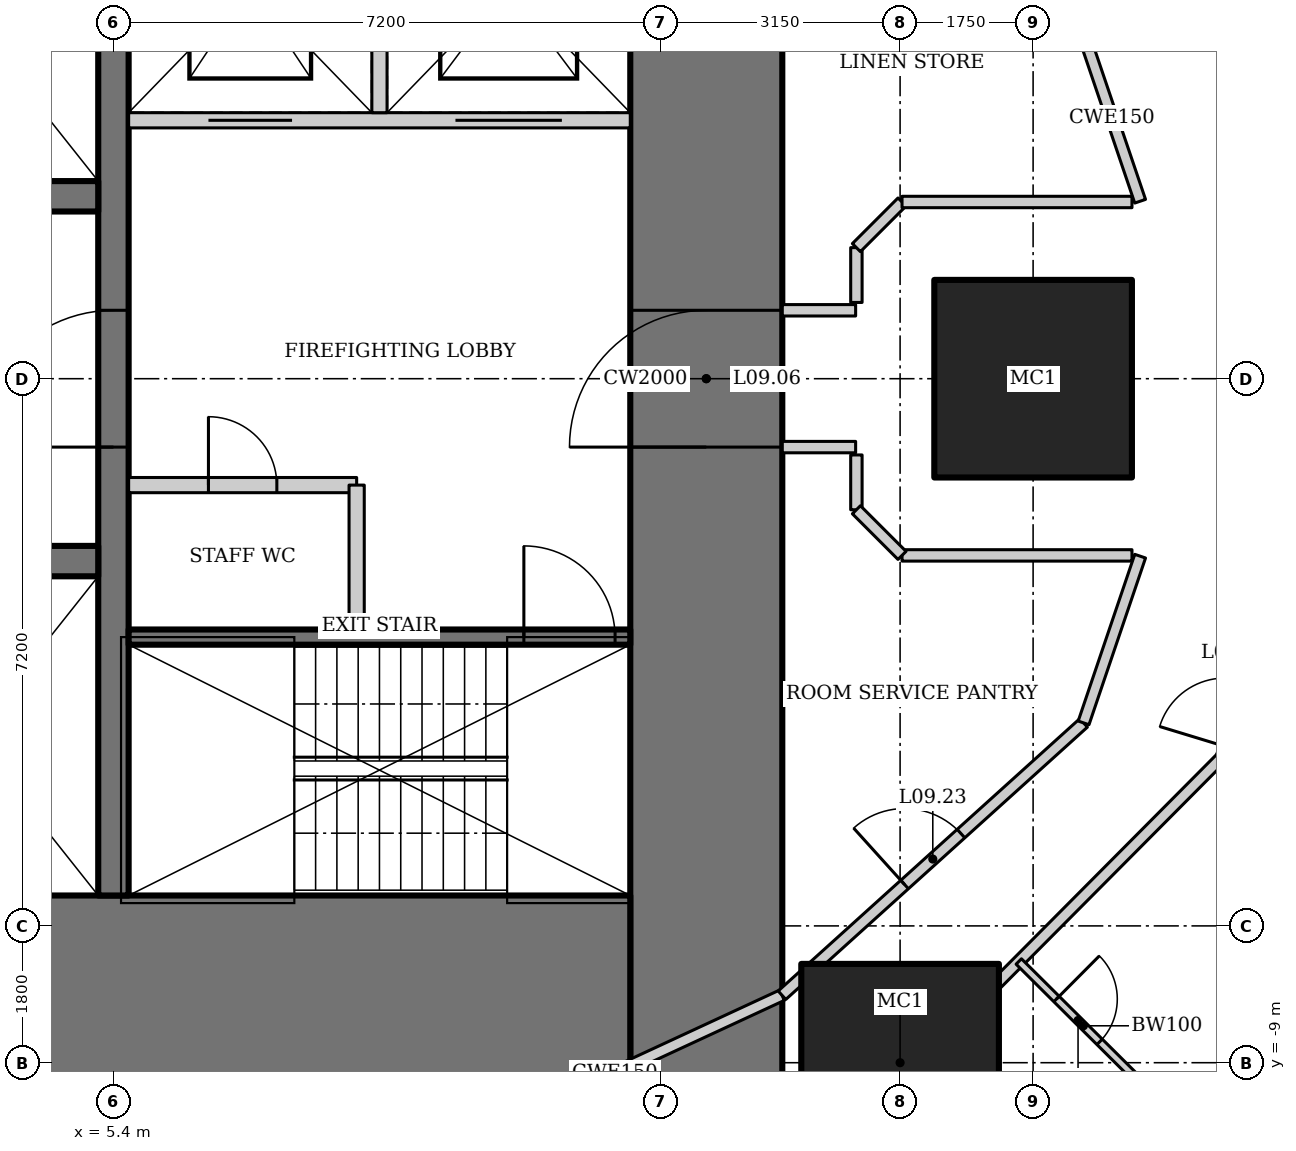
"""IFC4 building model, lengths in metres.
Left out: names, types, materials, properties, quantities, classifications, styles, units other than length and angle.
Written with IfcOpenShell. Run it as: python <this file> out.ifc"""

import sys

from ifc_helpers import new_model, si_unit, direction, frame, frame_2d, origin, origin_2d, place, context, subcontext, project, spatial, rectangle, hollow_rectangle, extrude, element, fill, save


model = new_model("IFC4")
c1 = context("Model", 3, precision=1e-05, world=origin(), true_north=direction((0.0, 1.0)))
c2 = subcontext(c1, "Body", "Model", "MODEL_VIEW")
j1 = project(units=[si_unit("LENGTHUNIT", "METRE"), si_unit("PLANEANGLEUNIT", "RADIAN")], contexts=[c1])
p1 = place(None, origin())
s1 = spatial("IfcSite", under=j1, at=p1, CompositionType="ELEMENT")
p2 = place(p1, origin())
s2 = spatial("IfcBuilding", under=s1, at=p2, CompositionType="ELEMENT")
p3 = place(p2, frame((0.0, 0.0, 47.8)))
s3 = spatial("IfcBuildingStorey", under=s2, at=p3, CompositionType="ELEMENT", Elevation=47.8)
for number, where, z_axis, x_axis in (
    (1, (17.5, 0.0, 0.0), (0.0, 0.0, 1.0), (1.0, 0.0, 0.0)),
    (2, (15.75, -9.0, 0.0), (0.0, 0.0, 1.0), (1.0, 0.0, 0.0)),
):
    element("IfcColumn", number, at=place(p3, frame(where, z_axis=z_axis, x_axis=x_axis)), inside=s3, PredefinedType="COLUMN", context=c2, shape_type="SweptSolid", body=[
        extrude(hollow_rectangle(XDim=2.6, YDim=2.6, WallThickness=0.13, at=origin_2d()), origin(), (0.0, 0.0, 1.0), 3.6),
    ])
p4 = place(p3, frame((13.2, -13.0, 0.0), z_axis=(0.0, 0.0, 1.0), x_axis=(0.0, 1.0, 0.0)))
e3 = element("IfcWall", 3, at=p4, inside=s3, PredefinedType="SHEAR", context=c2, shape_type="SweptSolid", body=[
    extrude(rectangle(XDim=26.0, YDim=2.0, at=frame_2d((13.0, 0.0))), origin(), (0.0, 0.0, 1.0), 3.6),
])
p5 = place(p4, frame((12.1, 0.0, 0.0)))
e4 = element("IfcOpeningElement", 4, at=p5, cuts=e3, PredefinedType="OPENING", context=c2, shape_type="SweptSolid", body=[
    extrude(rectangle(XDim=1.8, YDim=2.1, at=frame_2d((0.9, 1.05))), frame((0.0, 1.01, 0.0), z_axis=(0.0, -1.0, 0.0), x_axis=(1.0, 0.0, 0.0)), (0.0, 0.0, 1.0), 2.02),
])
p6 = place(p3, frame((-12.2, -8.0, 0.0), z_axis=(0.0, 0.0, 1.0), x_axis=(1.0, 0.0, 0.0)))
e5 = element("IfcWall", 5, at=p6, inside=s3, PredefinedType="SHEAR", context=c2, shape_type="SweptSolid", body=[
    extrude(rectangle(XDim=24.4, YDim=2.4, at=frame_2d((12.2, 0.0))), origin(), (0.0, 0.0, 1.0), 3.6),
])
p7 = place(p3, frame((5.4, -6.8, 0.0), z_axis=(0.0, 0.0, 1.0), x_axis=(0.0, 1.0, 0.0)))
e6 = element("IfcWall", 6, at=p7, inside=s3, PredefinedType="SHEAR", context=c2, shape_type="SweptSolid", body=[
    extrude(rectangle(XDim=13.6, YDim=0.4, at=frame_2d((6.8, 0.0))), origin(), (0.0, 0.0, 1.0), 3.6),
])
p8 = place(p7, frame((5.9, 0.0, 0.0)))
e7 = element("IfcOpeningElement", 7, at=p8, cuts=e6, PredefinedType="OPENING", context=c2, shape_type="SweptSolid", body=[
    extrude(rectangle(XDim=1.8, YDim=2.1, at=frame_2d((0.9, 1.05))), frame((0.0, 0.21, 0.0), z_axis=(0.0, -1.0, 0.0), x_axis=(1.0, 0.0, 0.0)), (0.0, 0.0, 1.0), 0.42),
])
p9 = place(p3, frame((-5.2, -2.4, 0.0), z_axis=(0.0, 0.0, 1.0), x_axis=(1.0, 0.0, 0.0)))
e8 = element("IfcWall", 8, at=p9, inside=s3, PredefinedType="SHEAR", context=c2, shape_type="SweptSolid", body=[
    extrude(rectangle(XDim=10.4, YDim=0.4, at=frame_2d((5.2, 0.0))), origin(), (0.0, 0.0, 1.0), 3.6),
])
p10 = place(p9, frame((0.55, 0.0, 0.0)))
e9 = element("IfcOpeningElement", 9, at=p10, cuts=e8, PredefinedType="OPENING", context=c2, shape_type="SweptSolid", body=[
    extrude(rectangle(XDim=1.1, YDim=2.2, at=frame_2d((0.55, 1.1))), frame((0.0, 0.21, 0.0), z_axis=(0.0, -1.0, 0.0), x_axis=(1.0, 0.0, 0.0)), (0.0, 0.0, 1.0), 0.42),
])
p11 = place(p9, frame((4.083, 0.0, 0.0)))
e10 = element("IfcOpeningElement", 10, at=p11, cuts=e8, PredefinedType="OPENING", context=c2, shape_type="SweptSolid", body=[
    extrude(rectangle(XDim=1.1, YDim=2.2, at=frame_2d((0.55, 1.1))), frame((0.0, 0.21, 0.0), z_axis=(0.0, -1.0, 0.0), x_axis=(1.0, 0.0, 0.0)), (0.0, 0.0, 1.0), 0.42),
])
p12 = place(p9, frame((7.617, 0.0, 0.0)))
e11 = element("IfcOpeningElement", 11, at=p12, cuts=e8, PredefinedType="OPENING", context=c2, shape_type="SweptSolid", body=[
    extrude(rectangle(XDim=1.1, YDim=2.2, at=frame_2d((0.55, 1.1))), frame((0.0, 0.21, 0.0), z_axis=(0.0, -1.0, 0.0), x_axis=(1.0, 0.0, 0.0)), (0.0, 0.0, 1.0), 0.42),
])
p13 = place(p3, frame((5.2, 2.4, 0.0), z_axis=(0.0, 0.0, 1.0), x_axis=(-1.0, 0.0, 0.0)))
e12 = element("IfcWall", 12, at=p13, inside=s3, PredefinedType="SHEAR", context=c2, shape_type="SweptSolid", body=[
    extrude(rectangle(XDim=10.4, YDim=0.4, at=frame_2d((5.2, 0.0))), origin(), (0.0, 0.0, 1.0), 3.6),
])
p14 = place(p3, frame((5.6, -3.4, 0.0), z_axis=(0.0, 0.0, 1.0), x_axis=(1.0, 0.0, 0.0)))
e13 = element("IfcWall", 13, at=p14, inside=s3, PredefinedType="SHEAR", context=c2, shape_type="SweptSolid", body=[
    extrude(rectangle(XDim=6.6, YDim=0.2, at=frame_2d((3.3, 0.0))), origin(), (0.0, 0.0, 1.0), 3.6),
])
p15 = place(p14, frame((5.2, 0.0, 0.0)))
e14 = element("IfcOpeningElement", 14, at=p15, cuts=e13, PredefinedType="OPENING", context=c2, shape_type="SweptSolid", body=[
    extrude(rectangle(XDim=1.2, YDim=2.1, at=frame_2d((0.6, 1.05))), frame((0.0, 0.11, 0.0), z_axis=(0.0, -1.0, 0.0), x_axis=(1.0, 0.0, 0.0)), (0.0, 0.0, 1.0), 0.22),
])
p16 = place(p3, frame((12.2, 3.4, 0.0), z_axis=(0.0, 0.0, 1.0), x_axis=(-1.0, 0.0, 0.0)))
e15 = element("IfcWall", 15, at=p16, inside=s3, PredefinedType="SOLIDWALL", context=c2, shape_type="SweptSolid", body=[
    extrude(rectangle(XDim=6.6, YDim=0.2, at=frame_2d((3.3, 0.0))), origin(), (0.0, 0.0, 1.0), 3.6),
])
p17 = place(p16, frame((4.45, 0.0, 0.0)))
e16 = element("IfcOpeningElement", 16, at=p17, cuts=e15, PredefinedType="OPENING", context=c2, shape_type="SweptSolid", body=[
    extrude(rectangle(XDim=1.1, YDim=2.2, at=frame_2d((0.55, 1.1))), frame((0.0, 0.11, 0.0), z_axis=(0.0, -1.0, 0.0), x_axis=(1.0, 0.0, 0.0)), (0.0, 0.0, 1.0), 0.22),
])
p18 = place(p16, frame((0.9, 0.0, 0.0)))
e17 = element("IfcOpeningElement", 17, at=p18, cuts=e15, PredefinedType="OPENING", context=c2, shape_type="SweptSolid", body=[
    extrude(rectangle(XDim=1.4, YDim=2.2, at=frame_2d((0.7, 1.1))), frame((0.0, 0.11, 0.0), z_axis=(0.0, -1.0, 0.0), x_axis=(1.0, 0.0, 0.0)), (0.0, 0.0, 1.0), 0.22),
])
p19 = place(p3, frame((8.9, 3.5, 0.0), z_axis=(0.0, 0.0, 1.0), x_axis=(0.0, 1.0, 0.0)))
e18 = element("IfcWall", 18, at=p19, inside=s3, PredefinedType="SOLIDWALL", context=c2, shape_type="SweptSolid", body=[
    extrude(rectangle(XDim=3.3, YDim=0.2, at=frame_2d((1.65, 0.0))), origin(), (0.0, 0.0, 1.0), 3.6),
])
p20 = place(p3, frame((5.6, -1.4, 0.0), z_axis=(0.0, 0.0, 1.0), x_axis=(1.0, 0.0, 0.0)))
e19 = element("IfcWall", 19, at=p20, inside=s3, PredefinedType="SOLIDWALL", context=c2, shape_type="SweptSolid", body=[
    extrude(rectangle(XDim=3.0, YDim=0.2, at=frame_2d((1.5, 0.0))), origin(), (0.0, 0.0, 1.0), 3.45),
])
p21 = place(p20, frame((1.05, 0.0, 0.0)))
e20 = element("IfcOpeningElement", 20, at=p21, cuts=e19, PredefinedType="OPENING", context=c2, shape_type="SweptSolid", body=[
    extrude(rectangle(XDim=0.9, YDim=2.1, at=frame_2d((0.45, 1.05))), frame((0.0, 0.11, 0.0), z_axis=(0.0, -1.0, 0.0), x_axis=(1.0, 0.0, 0.0)), (0.0, 0.0, 1.0), 0.22),
])
p22 = place(p3, frame((8.6, -1.4, 0.0), z_axis=(0.0, 0.0, 1.0), x_axis=(0.0, -1.0, 0.0)))
e21 = element("IfcWall", 21, at=p22, inside=s3, PredefinedType="SOLIDWALL", context=c2, shape_type="SweptSolid", body=[
    extrude(rectangle(XDim=1.9, YDim=0.2, at=frame_2d((0.95, 0.0))), origin(), (0.0, 0.0, 1.0), 3.45),
])
p23 = place(p3, frame((24.435, -13.909, 0.0), z_axis=(0.0, 0.0, 1.0), x_axis=(-0.870612006791, 0.491970256856, 0.0)))
e22 = element("IfcWall", 22, at=p23, inside=s3, PredefinedType="PARTITIONING", context=c2, shape_type="SweptSolid", body=[
    extrude(rectangle(XDim=9.802, YDim=0.15, at=frame_2d((4.901, 0.0))), origin(), (0.0, 0.0, 1.0), 2.693),
])
p24 = place(p3, frame((21.5, 0.0, 0.0), z_axis=(0.0, 0.0, 1.0), x_axis=(-0.291383581394, 0.95660629754, 0.0)))
e23 = element("IfcWall", 23, at=p24, inside=s3, PredefinedType="PARTITIONING", context=c2, shape_type="SweptSolid", body=[
    extrude(rectangle(XDim=5.208, YDim=0.15, at=frame_2d((2.604, 0.0))), origin(), (0.0, 0.0, 1.0), 3.45),
])
p25 = place(p3, frame((11.147, -11.544, 0.0), z_axis=(0.0, 0.0, 1.0), x_axis=(0.888333171507, 0.459199495209, 0.0)))
e24 = element("IfcWall", 24, at=p25, inside=s3, PredefinedType="PARTITIONING", context=c2, shape_type="SweptSolid", body=[
    extrude(rectangle(XDim=5.351, YDim=0.15, at=frame_2d((2.676, 0.0))), origin(), (0.0, 0.0, 1.0), 3.45),
])
p26 = place(p25, frame((0.15, 0.0, 0.0)))
e25 = element("IfcOpeningElement", 25, at=p26, cuts=e24, PredefinedType="OPENING", context=c2, shape_type="SweptSolid", body=[
    extrude(rectangle(XDim=0.9, YDim=2.1, at=frame_2d((0.45, 1.05))), frame((0.0, 0.085, 0.0), z_axis=(0.0, -1.0, 0.0), x_axis=(1.0, 0.0, 0.0)), (0.0, 0.0, 1.0), 0.17),
])
p27 = place(p3, frame((15.901, -9.086, 0.0), z_axis=(0.0, 0.0, 1.0), x_axis=(0.705121546414, 0.709086457904, 0.0)))
e26 = element("IfcWall", 26, at=p27, inside=s3, PredefinedType="PARTITIONING", context=c2, shape_type="SweptSolid", body=[
    extrude(rectangle(XDim=5.788, YDim=0.15, at=frame_2d((2.894, 0.0))), origin(), (0.0, 0.0, 1.0), 3.45),
])
p28 = place(p3, frame((19.982, -4.982, 0.0), z_axis=(0.0, 0.0, 1.0), x_axis=(0.291383581394, 0.95660629754, 0.0)))
e27 = element("IfcWall", 27, at=p28, inside=s3, PredefinedType="PARTITIONING", context=c2, shape_type="SweptSolid", body=[
    extrude(rectangle(XDim=5.208, YDim=0.15, at=frame_2d((2.604, 0.0))), origin(), (0.0, 0.0, 1.0), 3.45),
])
p29 = place(p28, frame((0.15, 0.0, 0.0)))
e28 = element("IfcOpeningElement", 28, at=p29, cuts=e27, PredefinedType="OPENING", context=c2, shape_type="SweptSolid", body=[
    extrude(rectangle(XDim=0.9, YDim=2.1, at=frame_2d((0.45, 1.05))), frame((0.0, 0.085, 0.0), z_axis=(0.0, -1.0, 0.0), x_axis=(1.0, 0.0, 0.0)), (0.0, 0.0, 1.0), 0.17),
])
p30 = place(p3, frame((9.801, -10.149, 0.0), z_axis=(0.0, 0.0, 1.0), x_axis=(0.907279653965, 0.420527798727, 0.0)))
e29 = element("IfcWall", 29, at=p30, inside=s3, PredefinedType="PARTITIONING", context=c2, shape_type="SweptSolid", body=[
    extrude(rectangle(XDim=4.844, YDim=0.15, at=frame_2d((2.422, 0.0))), origin(), (0.0, 0.0, 1.0), 3.45),
])
p31 = place(p3, frame((14.196, -8.112, 0.0), z_axis=(0.0, 0.0, 1.0), x_axis=(0.742194222, 0.670184852731, 0.0)))
e30 = element("IfcWall", 30, at=p31, inside=s3, PredefinedType="PARTITIONING", context=c2, shape_type="SweptSolid", body=[
    extrude(rectangle(XDim=5.347, YDim=0.15, at=frame_2d((2.673, 0.0))), origin(), (0.0, 0.0, 1.0), 3.45),
])
p32 = place(p31, frame((2.173, 0.0, 0.0)))
e31 = element("IfcOpeningElement", 31, at=p32, cuts=e30, PredefinedType="OPENING", context=c2, shape_type="SweptSolid", body=[
    extrude(rectangle(XDim=1.0, YDim=2.1, at=frame_2d((0.5, 1.05))), frame((0.0, 0.085, 0.0), z_axis=(0.0, -1.0, 0.0), x_axis=(1.0, 0.0, 0.0)), (0.0, 0.0, 1.0), 0.17),
])
p33 = place(p3, frame((17.311, -7.668, 0.0), z_axis=(0.0, 0.0, 1.0), x_axis=(0.709138392716, -0.705069315724, 0.0)))
e32 = element("IfcWall", 32, at=p33, inside=s3, PredefinedType="PARTITIONING", context=c2, shape_type="SweptSolid", body=[
    extrude(rectangle(XDim=2.4, YDim=0.1, at=frame_2d((1.2, 0.0))), origin(), (0.0, 0.0, 1.0), 3.45),
])
p34 = place(p33, frame((0.7, 0.0, 0.0)))
e33 = element("IfcOpeningElement", 33, at=p34, cuts=e32, PredefinedType="OPENING", context=c2, shape_type="SweptSolid", body=[
    extrude(rectangle(XDim=0.8, YDim=2.1, at=frame_2d((0.4, 1.05))), frame((0.0, 0.06, 0.0), z_axis=(0.0, -1.0, 0.0), x_axis=(1.0, 0.0, 0.0)), (0.0, 0.0, 1.0), 0.12),
])
for number, where, z_axis, x_axis in (
    (34, (18.908, 2.335, 0.0), (0.0, 0.0, 1.0), (-0.321, 0.947, 0.0)),
    (35, (18.164, -4.529, 0.0), (0.0, 0.0, 1.0), (0.321, 0.947, 0.0)),
):
    element("IfcWall", number, at=place(p3, frame(where, z_axis=z_axis, x_axis=x_axis)), inside=s3, PredefinedType="PARTITIONING", context=c2, shape_type="SweptSolid", body=[
        extrude(rectangle(XDim=2.317, YDim=0.15, at=frame_2d((1.158, 0.0))), origin(), (0.0, 0.0, 1.0), 3.45),
    ])
for number, where, z_axis, x_axis in (
    (36, (14.2, -0.9, 0.0), (0.0, 0.0, 1.0), (1.0, 0.0, 0.0)),
    (37, (14.2, 0.9, 0.0), (0.0, 0.0, 1.0), (1.0, 0.0, 0.0)),
):
    element("IfcWall", number, at=place(p3, frame(where, z_axis=z_axis, x_axis=x_axis)), inside=s3, PredefinedType="PARTITIONING", context=c2, shape_type="SweptSolid", body=[
        extrude(rectangle(XDim=0.965, YDim=0.15, at=frame_2d((0.482, 0.0))), origin(), (0.0, 0.0, 1.0), 3.45),
    ])
p35 = place(p3, frame((15.175, 1.003, 0.0), z_axis=(0.0, 0.0, 1.0), x_axis=(0.0, 1.0, 0.0)))
e38 = element("IfcWall", 38, at=p35, inside=s3, PredefinedType="PARTITIONING", context=c2, shape_type="SweptSolid", body=[
    extrude(rectangle(XDim=0.721, YDim=0.15, at=frame_2d((0.361, 0.0))), origin(), (0.0, 0.0, 1.0), 3.45),
])
p36 = place(p3, frame((15.175, 1.725, 0.0), z_axis=(0.0, 0.0, 1.0), x_axis=(0.707106781187, 0.707106781187, 0.0)))
e39 = element("IfcWall", 39, at=p36, inside=s3, PredefinedType="PARTITIONING", context=c2, shape_type="SweptSolid", body=[
    extrude(rectangle(XDim=0.849, YDim=0.15, at=frame_2d((0.425, 0.0))), origin(), (0.0, 0.0, 1.0), 3.45),
])
p37 = place(p3, frame((15.775, 2.325, 0.0), z_axis=(0.0, 0.0, 1.0), x_axis=(1.0, 0.0, 0.0)))
e40 = element("IfcWall", 40, at=p37, inside=s3, PredefinedType="PARTITIONING", context=c2, shape_type="SweptSolid", body=[
    extrude(rectangle(XDim=3.025, YDim=0.15, at=frame_2d((1.513, 0.0))), origin(), (0.0, 0.0, 1.0), 3.45),
])
p38 = place(p3, frame((15.175, -1.725, 0.0), z_axis=(0.0, 0.0, 1.0), x_axis=(0.0, 1.0, 0.0)))
e41 = element("IfcWall", 41, at=p38, inside=s3, PredefinedType="PARTITIONING", context=c2, shape_type="SweptSolid", body=[
    extrude(rectangle(XDim=0.721, YDim=0.15, at=frame_2d((0.361, 0.0))), origin(), (0.0, 0.0, 1.0), 3.45),
])
p39 = place(p3, frame((18.801, -2.325, 0.0), z_axis=(0.0, 0.0, 1.0), x_axis=(-1.0, 0.0, 0.0)))
e42 = element("IfcWall", 42, at=p39, inside=s3, PredefinedType="PARTITIONING", context=c2, shape_type="SweptSolid", body=[
    extrude(rectangle(XDim=3.025, YDim=0.15, at=frame_2d((1.513, 0.0))), origin(), (0.0, 0.0, 1.0), 3.45),
])
p40 = place(p3, frame((15.775, -2.325, 0.0), z_axis=(0.0, 0.0, 1.0), x_axis=(-0.707106781187, 0.707106781187, 0.0)))
e43 = element("IfcWall", 43, at=p40, inside=s3, PredefinedType="PARTITIONING", context=c2, shape_type="SweptSolid", body=[
    extrude(rectangle(XDim=0.849, YDim=0.15, at=frame_2d((0.425, 0.0))), origin(), (0.0, 0.0, 1.0), 3.45),
])
p41 = place(p21, origin())
e44 = element("IfcDoor", 44, at=p41, inside=s3, OperationType="SINGLE_SWING_LEFT", PredefinedType="DOOR", context=c2, shape_type="SweptSolid", body=[
    extrude(rectangle(XDim=0.9, YDim=2.1, at=frame_2d((0.45, 1.05))), frame((0.0, 0.025, 0.0), z_axis=(0.0, -1.0, 0.0), x_axis=(1.0, 0.0, 0.0)), (0.0, 0.0, 1.0), 0.05),
])
fill(e20, e44)
p42 = place(p8, origin())
e45 = element("IfcDoor", 45, at=p42, inside=s3, OperationType="DOUBLE_DOOR_DOUBLE_SWING", PredefinedType="DOOR", context=c2, shape_type="SweptSolid", body=[
    extrude(rectangle(XDim=1.8, YDim=2.1, at=frame_2d((0.9, 1.05))), frame((0.0, 0.025, 0.0), z_axis=(0.0, -1.0, 0.0), x_axis=(1.0, 0.0, 0.0)), (0.0, 0.0, 1.0), 0.05),
])
fill(e7, e45)
p43 = place(p15, origin())
e46 = element("IfcDoor", 46, at=p43, inside=s3, OperationType="SINGLE_SWING_RIGHT", PredefinedType="DOOR", context=c2, shape_type="SweptSolid", body=[
    extrude(rectangle(XDim=1.2, YDim=2.1, at=frame_2d((0.6, 1.05))), frame((0.0, 0.025, 0.0), z_axis=(0.0, -1.0, 0.0), x_axis=(1.0, 0.0, 0.0)), (0.0, 0.0, 1.0), 0.05),
])
fill(e14, e46)
p44 = place(p5, origin())
e47 = element("IfcDoor", 47, at=p44, inside=s3, OperationType="DOUBLE_DOOR_DOUBLE_SWING", PredefinedType="DOOR", context=c2, shape_type="SweptSolid", body=[
    extrude(rectangle(XDim=1.8, YDim=2.1, at=frame_2d((0.9, 1.05))), frame((0.0, 0.025, 0.0), z_axis=(0.0, -1.0, 0.0), x_axis=(1.0, 0.0, 0.0)), (0.0, 0.0, 1.0), 0.05),
])
fill(e4, e47)
p45 = place(p17, origin())
e48 = element("IfcDoor", 48, at=p45, inside=s3, OperationType="DOUBLE_DOOR_SLIDING", PredefinedType="DOOR", context=c2, shape_type="SweptSolid", body=[
    extrude(rectangle(XDim=1.1, YDim=2.2, at=frame_2d((0.55, 1.1))), frame((0.0, 0.025, 0.0), z_axis=(0.0, -1.0, 0.0), x_axis=(1.0, 0.0, 0.0)), (0.0, 0.0, 1.0), 0.05),
])
fill(e16, e48)
p46 = place(p18, origin())
e49 = element("IfcDoor", 49, at=p46, inside=s3, OperationType="DOUBLE_DOOR_SLIDING", PredefinedType="DOOR", context=c2, shape_type="SweptSolid", body=[
    extrude(rectangle(XDim=1.4, YDim=2.2, at=frame_2d((0.7, 1.1))), frame((0.0, 0.025, 0.0), z_axis=(0.0, -1.0, 0.0), x_axis=(1.0, 0.0, 0.0)), (0.0, 0.0, 1.0), 0.05),
])
fill(e17, e49)
p47 = place(p32, origin())
e50 = element("IfcDoor", 50, at=p47, inside=s3, OperationType="SINGLE_SWING_LEFT", PredefinedType="DOOR", context=c2, shape_type="SweptSolid", body=[
    extrude(rectangle(XDim=1.0, YDim=2.1, at=frame_2d((0.5, 1.05))), frame((0.0, 0.025, 0.0), z_axis=(0.0, -1.0, 0.0), x_axis=(1.0, 0.0, 0.0)), (0.0, 0.0, 1.0), 0.05),
])
fill(e31, e50)
p48 = place(p34, origin())
e51 = element("IfcDoor", 51, at=p48, inside=s3, OperationType="SINGLE_SWING_LEFT", PredefinedType="DOOR", context=c2, shape_type="SweptSolid", body=[
    extrude(rectangle(XDim=0.8, YDim=2.1, at=frame_2d((0.4, 1.05))), frame((0.0, 0.025, 0.0), z_axis=(0.0, -1.0, 0.0), x_axis=(1.0, 0.0, 0.0)), (0.0, 0.0, 1.0), 0.05),
])
fill(e33, e51)
save(model, sys.argv[1])
